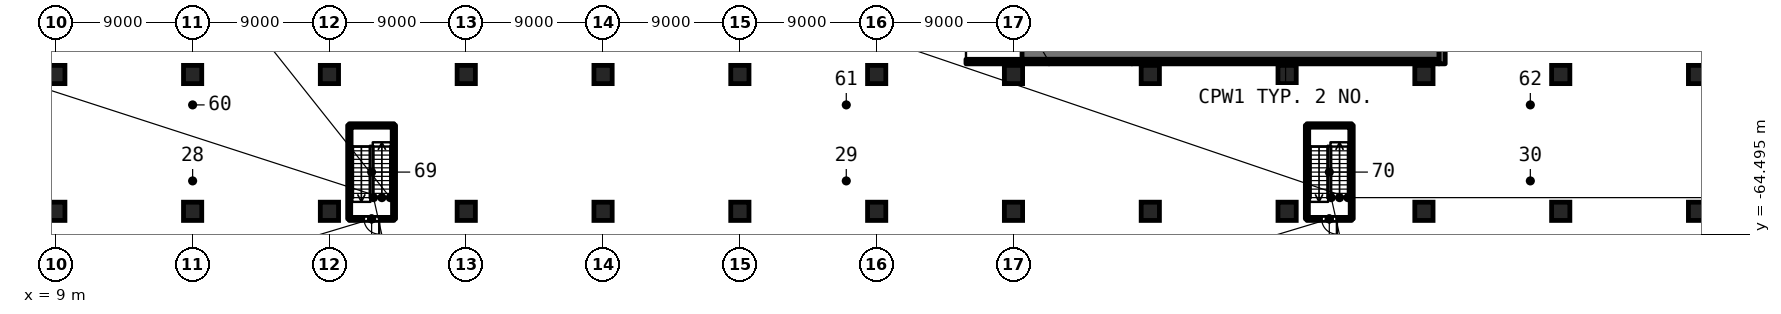
"""IFC4 building model, lengths in metres.
Left out: names, types, materials, properties, quantities, classifications, styles, units other than length and angle.
Written with IfcOpenShell. Run it as: python <this file> out.ifc"""

import sys

from ifc_helpers import new_model, si_unit, direction, frame, frame_2d, origin, origin_2d, place, context, subcontext, project, spatial, polyline, rectangle, outline, extrude, element, fill, save


model = new_model("IFC4")
c1 = context("Model", 3, precision=1e-05, world=origin(), true_north=direction((0.0, 1.0)))
c2 = subcontext(c1, "Body", "Model", "MODEL_VIEW")
j1 = project(units=[si_unit("LENGTHUNIT", "METRE"), si_unit("PLANEANGLEUNIT", "RADIAN")], contexts=[c1])
p1 = place(None, origin())
s1 = spatial("IfcSite", under=j1, at=p1, CompositionType="ELEMENT")
p2 = place(p1, origin())
s2 = spatial("IfcBuilding", under=s1, at=p2, CompositionType="ELEMENT")
p3 = place(p2, frame((0.0, 0.0, -9.0)))
s3 = spatial("IfcBuildingStorey", under=s2, at=p3, CompositionType="ELEMENT", Elevation=-9.0)
for number, where, z_axis, x_axis in (
    (1, (9.0, -63.0, 0.0), (0.0, 0.0, 1.0), (1.0, 0.0, 0.0)),
    (2, (9.0, -54.0, 0.0), (0.0, 0.0, 1.0), (1.0, 0.0, 0.0)),
    (3, (18.0, -63.0, 0.0), (0.0, 0.0, 1.0), (1.0, 0.0, 0.0)),
    (4, (18.0, -54.0, 0.0), (0.0, 0.0, 1.0), (1.0, 0.0, 0.0)),
    (5, (27.0, -63.0, 0.0), (0.0, 0.0, 1.0), (1.0, 0.0, 0.0)),
    (6, (27.0, -54.0, 0.0), (0.0, 0.0, 1.0), (1.0, 0.0, 0.0)),
    (7, (36.0, -63.0, 0.0), (0.0, 0.0, 1.0), (1.0, 0.0, 0.0)),
    (8, (36.0, -54.0, 0.0), (0.0, 0.0, 1.0), (1.0, 0.0, 0.0)),
    (9, (45.0, -63.0, 0.0), (0.0, 0.0, 1.0), (1.0, 0.0, 0.0)),
    (10, (45.0, -54.0, 0.0), (0.0, 0.0, 1.0), (1.0, 0.0, 0.0)),
    (11, (54.0, -63.0, 0.0), (0.0, 0.0, 1.0), (1.0, 0.0, 0.0)),
    (12, (54.0, -54.0, 0.0), (0.0, 0.0, 1.0), (1.0, 0.0, 0.0)),
    (13, (63.0, -63.0, 0.0), (0.0, 0.0, 1.0), (1.0, 0.0, 0.0)),
    (14, (63.0, -54.0, 0.0), (0.0, 0.0, 1.0), (1.0, 0.0, 0.0)),
    (15, (72.0, -63.0, 0.0), (0.0, 0.0, 1.0), (1.0, 0.0, 0.0)),
    (16, (72.0, -54.0, 0.0), (0.0, 0.0, 1.0), (1.0, 0.0, 0.0)),
    (17, (81.0, -63.0, 0.0), (0.0, 0.0, 1.0), (1.0, 0.0, 0.0)),
    (18, (81.0, -54.0, 0.0), (0.0, 0.0, 1.0), (1.0, 0.0, 0.0)),
    (19, (90.0, -63.0, 0.0), (0.0, 0.0, 1.0), (1.0, 0.0, 0.0)),
    (20, (90.0, -54.0, 0.0), (0.0, 0.0, 1.0), (1.0, 0.0, 0.0)),
    (21, (99.0, -63.0, 0.0), (0.0, 0.0, 1.0), (1.0, 0.0, 0.0)),
    (22, (99.0, -54.0, 0.0), (0.0, 0.0, 1.0), (1.0, 0.0, 0.0)),
    (23, (108.0, -63.0, 0.0), (0.0, 0.0, 1.0), (1.0, 0.0, 0.0)),
    (24, (108.0, -54.0, 0.0), (0.0, 0.0, 1.0), (1.0, 0.0, 0.0)),
    (25, (117.0, -63.0, 0.0), (0.0, 0.0, 1.0), (1.0, 0.0, 0.0)),
    (26, (117.0, -54.0, 0.0), (0.0, 0.0, 1.0), (1.0, 0.0, 0.0)),
):
    element("IfcColumn", number, at=place(p3, frame(where, z_axis=z_axis, x_axis=x_axis)), inside=s3, PredefinedType="COLUMN", context=c2, shape_type="SweptSolid", body=[
        extrude(rectangle(XDim=1.2, YDim=1.2, at=origin_2d()), origin(), (0.0, 0.0, 1.0), 4.5),
    ])
p4 = place(p3, frame((100.0, -49.5, 0.0), z_axis=(0.0, 0.0, 1.0), x_axis=(-1.0, 0.0, 0.0)))
e27 = element("IfcWall", 27, at=p4, inside=s3, PredefinedType="SOLIDWALL", context=c2, shape_type="SweptSolid", body=[
    extrude(outline(polyline([(0.0, 0.0), (27.438, 0.0), (27.438, 0.05), (3.0, 3.96), (0.0, 4.2), (0.0, 0.0)])), frame((0.0, 3.5, 0.0), z_axis=(0.0, -1.0, 0.0), x_axis=(1.0, 0.0, 0.0)), (0.0, 0.0, 1.0), 7.0),
])
p5 = place(p3, frame((100.0, -53.15, 0.0), z_axis=(0.0, 0.0, 1.0), x_axis=(-1.0, 0.0, 0.0)))
e28 = element("IfcWall", 28, at=p5, inside=s3, PredefinedType="SOLIDWALL", context=c2, shape_type="SweptSolid", body=[
    extrude(rectangle(XDim=20.2, YDim=0.3, at=frame_2d((10.1, 0.0))), origin(), (0.0, 0.0, 1.0), 5.6),
])
p6 = place(p3, frame((79.8, -53.15, 0.0), z_axis=(0.0, 0.0, 1.0), x_axis=(-1.0, 0.0, 0.0)))
e29 = element("IfcWall", 29, at=p6, inside=s3, PredefinedType="SOLIDWALL", context=c2, shape_type="SweptSolid", body=[
    extrude(rectangle(XDim=10.925, YDim=0.3, at=frame_2d((5.462, 0.0))), origin(), (0.0, 0.0, 1.0), 4.1),
])
p7 = place(p3, frame((100.2, -53.3, 0.0), z_axis=(0.0, 0.0, 1.0), x_axis=(0.0, 1.0, 0.0)))
e30 = element("IfcWall", 30, at=p7, inside=s3, PredefinedType="SOLIDWALL", context=c2, shape_type="SweptSolid", body=[
    extrude(rectangle(XDim=7.6, YDim=0.4, at=frame_2d((3.8, 0.0))), origin(), (0.0, 0.0, 1.0), 4.1),
])
p8 = place(p3, frame((31.25, -63.5, 0.0), z_axis=(0.0, 0.0, 1.0), x_axis=(-1.0, 0.0, 0.0)))
e31 = element("IfcWall", 31, at=p8, inside=s3, PredefinedType="SOLIDWALL", context=c2, shape_type="SweptSolid", body=[
    extrude(rectangle(XDim=2.95, YDim=0.2, at=frame_2d((1.475, 0.0))), origin(), (0.0, 0.0, 1.0), 4.1),
])
p9 = place(p8, frame((0.975, 0.0, 0.0)))
e32 = element("IfcOpeningElement", 32, at=p9, cuts=e31, PredefinedType="OPENING", context=c2, shape_type="SweptSolid", body=[
    extrude(rectangle(XDim=1.0, YDim=2.1, at=frame_2d((0.5, 1.05))), frame((0.0, 0.11, 0.0), z_axis=(0.0, -1.0, 0.0), x_axis=(1.0, 0.0, 0.0)), (0.0, 0.0, 1.0), 0.22),
])
p10 = place(p3, frame((28.3, -63.5, 0.0), z_axis=(0.0, 0.0, 1.0), x_axis=(0.0, 1.0, 0.0)))
e33 = element("IfcWall", 33, at=p10, inside=s3, PredefinedType="SOLIDWALL", context=c2, shape_type="SweptSolid", body=[
    extrude(rectangle(XDim=6.16, YDim=0.2, at=frame_2d((3.08, 0.0))), origin(), (0.0, 0.0, 1.0), 4.1),
])
p11 = place(p3, frame((28.3, -57.34, 0.0), z_axis=(0.0, 0.0, 1.0), x_axis=(1.0, 0.0, 0.0)))
e34 = element("IfcWall", 34, at=p11, inside=s3, PredefinedType="SOLIDWALL", context=c2, shape_type="SweptSolid", body=[
    extrude(rectangle(XDim=2.95, YDim=0.2, at=frame_2d((1.475, 0.0))), origin(), (0.0, 0.0, 1.0), 4.1),
])
p12 = place(p3, frame((31.25, -57.34, 0.0), z_axis=(0.0, 0.0, 1.0), x_axis=(0.0, -1.0, 0.0)))
e35 = element("IfcWall", 35, at=p12, inside=s3, PredefinedType="SOLIDWALL", context=c2, shape_type="SweptSolid", body=[
    extrude(rectangle(XDim=6.16, YDim=0.2, at=frame_2d((3.08, 0.0))), origin(), (0.0, 0.0, 1.0), 4.1),
])
p13 = place(p3, frame((94.25, -63.5, 0.0), z_axis=(0.0, 0.0, 1.0), x_axis=(-1.0, 0.0, 0.0)))
e36 = element("IfcWall", 36, at=p13, inside=s3, PredefinedType="SOLIDWALL", context=c2, shape_type="SweptSolid", body=[
    extrude(rectangle(XDim=2.95, YDim=0.2, at=frame_2d((1.475, 0.0))), origin(), (0.0, 0.0, 1.0), 4.1),
])
p14 = place(p13, frame((0.975, 0.0, 0.0)))
e37 = element("IfcOpeningElement", 37, at=p14, cuts=e36, PredefinedType="OPENING", context=c2, shape_type="SweptSolid", body=[
    extrude(rectangle(XDim=1.0, YDim=2.1, at=frame_2d((0.5, 1.05))), frame((0.0, 0.11, 0.0), z_axis=(0.0, -1.0, 0.0), x_axis=(1.0, 0.0, 0.0)), (0.0, 0.0, 1.0), 0.22),
])
p15 = place(p3, frame((91.3, -63.5, 0.0), z_axis=(0.0, 0.0, 1.0), x_axis=(0.0, 1.0, 0.0)))
e38 = element("IfcWall", 38, at=p15, inside=s3, PredefinedType="SOLIDWALL", context=c2, shape_type="SweptSolid", body=[
    extrude(rectangle(XDim=6.16, YDim=0.2, at=frame_2d((3.08, 0.0))), origin(), (0.0, 0.0, 1.0), 4.1),
])
p16 = place(p3, frame((91.3, -57.34, 0.0), z_axis=(0.0, 0.0, 1.0), x_axis=(1.0, 0.0, 0.0)))
e39 = element("IfcWall", 39, at=p16, inside=s3, PredefinedType="SOLIDWALL", context=c2, shape_type="SweptSolid", body=[
    extrude(rectangle(XDim=2.95, YDim=0.2, at=frame_2d((1.475, 0.0))), origin(), (0.0, 0.0, 1.0), 4.1),
])
p17 = place(p3, frame((94.25, -57.34, 0.0), z_axis=(0.0, 0.0, 1.0), x_axis=(0.0, -1.0, 0.0)))
e40 = element("IfcWall", 40, at=p17, inside=s3, PredefinedType="SOLIDWALL", context=c2, shape_type="SweptSolid", body=[
    extrude(rectangle(XDim=6.16, YDim=0.2, at=frame_2d((3.08, 0.0))), origin(), (0.0, 0.0, 1.0), 4.1),
])
p18 = place(p9, origin())
e41 = element("IfcDoor", 41, at=p18, inside=s3, OperationType="SINGLE_SWING_LEFT", PredefinedType="DOOR", context=c2, shape_type="SweptSolid", body=[
    extrude(rectangle(XDim=1.0, YDim=2.1, at=frame_2d((0.5, 1.05))), frame((0.0, 0.025, 0.0), z_axis=(0.0, -1.0, 0.0), x_axis=(1.0, 0.0, 0.0)), (0.0, 0.0, 1.0), 0.05),
])
fill(e32, e41)
p19 = place(p14, origin())
e42 = element("IfcDoor", 42, at=p19, inside=s3, OperationType="SINGLE_SWING_LEFT", PredefinedType="DOOR", context=c2, shape_type="SweptSolid", body=[
    extrude(rectangle(XDim=1.0, YDim=2.1, at=frame_2d((0.5, 1.05))), frame((0.0, 0.025, 0.0), z_axis=(0.0, -1.0, 0.0), x_axis=(1.0, 0.0, 0.0)), (0.0, 0.0, 1.0), 0.05),
])
fill(e37, e42)
save(model, sys.argv[1])
